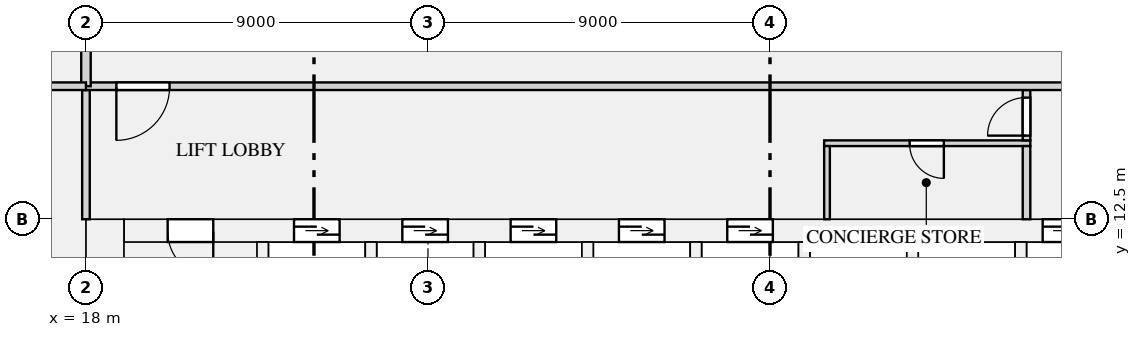
"""IFC4 building model, lengths in metres.
Left out: names, types, materials, properties, quantities, classifications, styles, units other than length and angle.
Written with IfcOpenShell. Run it as: python <this file> out.ifc"""

import sys

from ifc_helpers import new_model, si_unit, direction, frame, frame_2d, origin, place, context, subcontext, project, spatial, rectangle, extrude, element, fill, save


model = new_model("IFC4")
c1 = context("Model", 3, precision=1e-05, world=origin(), true_north=direction((0.0, 1.0)))
c2 = subcontext(c1, "Body", "Model", "MODEL_VIEW")
j1 = project(units=[si_unit("LENGTHUNIT", "METRE"), si_unit("PLANEANGLEUNIT", "RADIAN")], contexts=[c1])
p1 = place(None, origin())
s1 = spatial("IfcSite", under=j1, at=p1, CompositionType="ELEMENT")
p2 = place(p1, origin())
s2 = spatial("IfcBuilding", under=s1, at=p2, CompositionType="ELEMENT")
p3 = place(p2, frame((0.0, 0.0, 6.5)))
s3 = spatial("IfcBuildingStorey", under=s2, at=p3, CompositionType="ELEMENT", Elevation=6.5)
p4 = place(p3, frame((18.5, 0.0, 0.0), z_axis=(0.0, 0.0, 1.0), x_axis=(0.0, 1.0, 0.0)))
e1 = element("IfcWall", 1, at=p4, inside=s3, PredefinedType="SHEAR", context=c2, shape_type="SweptSolid", body=[
    extrude(rectangle(XDim=12.5, YDim=1.0, at=frame_2d((6.25, 0.0))), origin(), (0.0, 0.0, 1.0), 4.5),
])
p5 = place(p3, frame((19.0, 12.2, 0.0), z_axis=(0.0, 0.0, 1.0), x_axis=(1.0, 0.0, 0.0)))
e2 = element("IfcWall", 2, at=p5, inside=s3, PredefinedType="SHEAR", context=c2, shape_type="SweptSolid", body=[
    extrude(rectangle(XDim=34.0, YDim=0.6, at=frame_2d((17.0, 0.0))), origin(), (0.0, 0.0, 1.0), 4.5),
])
p6 = place(p5, frame((4.475, 0.0, 0.0)))
e3 = element("IfcOpeningElement", 3, at=p6, cuts=e2, PredefinedType="OPENING", context=c2, shape_type="SweptSolid", body=[
    extrude(rectangle(XDim=1.2, YDim=2.1, at=frame_2d((0.6, 1.05))), frame((0.0, 0.31, 0.0), z_axis=(0.0, -1.0, 0.0), x_axis=(1.0, 0.0, 0.0)), (0.0, 0.0, 1.0), 0.62),
])
p7 = place(p5, frame((7.325, 0.0, 0.0)))
e4 = element("IfcOpeningElement", 4, at=p7, cuts=e2, PredefinedType="OPENING", context=c2, shape_type="SweptSolid", body=[
    extrude(rectangle(XDim=1.2, YDim=2.1, at=frame_2d((0.6, 1.05))), frame((0.0, 0.31, 0.0), z_axis=(0.0, -1.0, 0.0), x_axis=(1.0, 0.0, 0.0)), (0.0, 0.0, 1.0), 0.62),
])
p8 = place(p5, frame((10.175, 0.0, 0.0)))
e5 = element("IfcOpeningElement", 5, at=p8, cuts=e2, PredefinedType="OPENING", context=c2, shape_type="SweptSolid", body=[
    extrude(rectangle(XDim=1.2, YDim=2.1, at=frame_2d((0.6, 1.05))), frame((0.0, 0.31, 0.0), z_axis=(0.0, -1.0, 0.0), x_axis=(1.0, 0.0, 0.0)), (0.0, 0.0, 1.0), 0.62),
])
p9 = place(p5, frame((13.025, 0.0, 0.0)))
e6 = element("IfcOpeningElement", 6, at=p9, cuts=e2, PredefinedType="OPENING", context=c2, shape_type="SweptSolid", body=[
    extrude(rectangle(XDim=1.2, YDim=2.1, at=frame_2d((0.6, 1.05))), frame((0.0, 0.31, 0.0), z_axis=(0.0, -1.0, 0.0), x_axis=(1.0, 0.0, 0.0)), (0.0, 0.0, 1.0), 0.62),
])
p10 = place(p5, frame((15.875, 0.0, 0.0)))
e7 = element("IfcOpeningElement", 7, at=p10, cuts=e2, PredefinedType="OPENING", context=c2, shape_type="SweptSolid", body=[
    extrude(rectangle(XDim=1.2, YDim=2.1, at=frame_2d((0.6, 1.05))), frame((0.0, 0.31, 0.0), z_axis=(0.0, -1.0, 0.0), x_axis=(1.0, 0.0, 0.0)), (0.0, 0.0, 1.0), 0.62),
])
p11 = place(p5, frame((24.175, 0.0, 0.0)))
e8 = element("IfcOpeningElement", 8, at=p11, cuts=e2, PredefinedType="OPENING", context=c2, shape_type="SweptSolid", body=[
    extrude(rectangle(XDim=1.1, YDim=2.1, at=frame_2d((0.55, 1.05))), frame((0.0, 0.31, 0.0), z_axis=(0.0, -1.0, 0.0), x_axis=(1.0, 0.0, 0.0)), (0.0, 0.0, 1.0), 0.62),
])
p12 = place(p5, frame((26.425, 0.0, 0.0)))
e9 = element("IfcOpeningElement", 9, at=p12, cuts=e2, PredefinedType="OPENING", context=c2, shape_type="SweptSolid", body=[
    extrude(rectangle(XDim=1.1, YDim=2.1, at=frame_2d((0.55, 1.05))), frame((0.0, 0.31, 0.0), z_axis=(0.0, -1.0, 0.0), x_axis=(1.0, 0.0, 0.0)), (0.0, 0.0, 1.0), 0.62),
])
p13 = place(p5, frame((28.675, 0.0, 0.0)))
e10 = element("IfcOpeningElement", 10, at=p13, cuts=e2, PredefinedType="OPENING", context=c2, shape_type="SweptSolid", body=[
    extrude(rectangle(XDim=1.1, YDim=2.1, at=frame_2d((0.55, 1.05))), frame((0.0, 0.31, 0.0), z_axis=(0.0, -1.0, 0.0), x_axis=(1.0, 0.0, 0.0)), (0.0, 0.0, 1.0), 0.62),
])
p14 = place(p5, frame((1.15, 0.0, 0.0)))
e11 = element("IfcOpeningElement", 11, at=p14, cuts=e2, PredefinedType="OPENING", context=c2, shape_type="SweptSolid", body=[
    extrude(rectangle(XDim=1.2, YDim=2.1, at=frame_2d((0.6, 1.05))), frame((0.0, 0.31, 0.0), z_axis=(0.0, -1.0, 0.0), x_axis=(1.0, 0.0, 0.0)), (0.0, 0.0, 1.0), 0.62),
])
p15 = place(p5, frame((31.65, 0.0, 0.0)))
e12 = element("IfcOpeningElement", 12, at=p15, cuts=e2, PredefinedType="OPENING", context=c2, shape_type="SweptSolid", body=[
    extrude(rectangle(XDim=1.2, YDim=2.1, at=frame_2d((0.6, 1.05))), frame((0.0, 0.31, 0.0), z_axis=(0.0, -1.0, 0.0), x_axis=(1.0, 0.0, 0.0)), (0.0, 0.0, 1.0), 0.62),
])
for number, where, z_axis, x_axis in (
    (13, (22.65, 9.35, 0.0), (0.0, 0.0, 1.0), (0.0, 1.0, 0.0)),
    (14, (25.5, 9.35, 0.0), (0.0, 0.0, 1.0), (0.0, 1.0, 0.0)),
    (15, (28.35, 9.35, 0.0), (0.0, 0.0, 1.0), (0.0, 1.0, 0.0)),
    (16, (31.2, 9.35, 0.0), (0.0, 0.0, 1.0), (0.0, 1.0, 0.0)),
    (17, (34.05, 9.35, 0.0), (0.0, 0.0, 1.0), (0.0, 1.0, 0.0)),
    (18, (36.9, 9.35, 0.0), (0.0, 0.0, 1.0), (0.0, 1.0, 0.0)),
    (19, (39.75, 9.35, 0.0), (0.0, 0.0, 1.0), (0.0, 1.0, 0.0)),
):
    element("IfcWall", number, at=place(p3, frame(where, z_axis=z_axis, x_axis=x_axis)), inside=s3, PredefinedType="SHEAR", context=c2, shape_type="SweptSolid", body=[
        extrude(rectangle(XDim=2.55, YDim=0.3, at=frame_2d((1.275, 0.0))), origin(), (0.0, 0.0, 1.0), 4.5),
    ])
p16 = place(p3, frame((42.6, 8.25, 0.0), z_axis=(0.0, 0.0, 1.0), x_axis=(0.0, 1.0, 0.0)))
e20 = element("IfcWall", 20, at=p16, inside=s3, PredefinedType="SHEAR", context=c2, shape_type="SweptSolid", body=[
    extrude(rectangle(XDim=3.65, YDim=0.3, at=frame_2d((1.825, 0.0))), origin(), (0.0, 0.0, 1.0), 4.5),
])
p17 = place(p3, frame((37.425, 14.5, 0.0), z_axis=(0.0, 0.0, 1.0), x_axis=(1.0, 0.0, 0.0)))
e21 = element("IfcWall", 21, at=p17, inside=s3, PredefinedType="PARTITIONING", context=c2, shape_type="SweptSolid", body=[
    extrude(rectangle(XDim=5.425, YDim=0.15, at=frame_2d((2.712, 0.0))), origin(), (0.0, 0.0, 1.0), 4.098),
])
p18 = place(p17, frame((2.25, 0.0, 0.0)))
e22 = element("IfcOpeningElement", 22, at=p18, cuts=e21, PredefinedType="OPENING", context=c2, shape_type="SweptSolid", body=[
    extrude(rectangle(XDim=0.9, YDim=2.1, at=frame_2d((0.45, 1.05))), frame((0.0, 0.085, 0.0), z_axis=(0.0, -1.0, 0.0), x_axis=(1.0, 0.0, 0.0)), (0.0, 0.0, 1.0), 0.17),
])
p19 = place(p3, frame((18.0, 12.5, 0.0), z_axis=(0.0, 0.0, 1.0), x_axis=(0.0, 1.0, 0.0)))
e23 = element("IfcWall", 23, at=p19, inside=s3, PredefinedType="PARTITIONING", context=c2, shape_type="SweptSolid", body=[
    extrude(rectangle(XDim=3.4, YDim=0.2, at=frame_2d((1.7, 0.0))), origin(), (0.0, 0.0, 1.0), 4.098),
])
p20 = place(p3, frame((37.5, 12.5, 0.0), z_axis=(0.0, 0.0, 1.0), x_axis=(0.0, 1.0, 0.0)))
e24 = element("IfcWall", 24, at=p20, inside=s3, PredefinedType="PARTITIONING", context=c2, shape_type="SweptSolid", body=[
    extrude(rectangle(XDim=1.925, YDim=0.15, at=frame_2d((0.962, 0.0))), origin(), (0.0, 0.0, 1.0), 4.098),
])
p21 = place(p3, frame((42.75, 12.5, 0.0), z_axis=(0.0, 0.0, 1.0), x_axis=(0.0, 1.0, 0.0)))
e25 = element("IfcWall", 25, at=p21, inside=s3, PredefinedType="PARTITIONING", context=c2, shape_type="SweptSolid", body=[
    extrude(rectangle(XDim=1.925, YDim=0.2, at=frame_2d((0.962, 0.0))), origin(), (0.0, 0.0, 1.0), 4.098),
])
p22 = place(p3, frame((42.75, 14.575, 0.0), z_axis=(0.0, 0.0, 1.0), x_axis=(0.0, 1.0, 0.0)))
e26 = element("IfcWall", 26, at=p22, inside=s3, PredefinedType="PARTITIONING", context=c2, shape_type="SweptSolid", body=[
    extrude(rectangle(XDim=1.325, YDim=0.2, at=frame_2d((0.663, 0.0))), origin(), (0.0, 0.0, 1.0), 4.098),
])
p23 = place(p22, frame((0.125, 0.0, 0.0)))
e27 = element("IfcOpeningElement", 27, at=p23, cuts=e26, PredefinedType="OPENING", context=c2, shape_type="SweptSolid", body=[
    extrude(rectangle(XDim=1.0, YDim=2.1, at=frame_2d((0.5, 1.05))), frame((0.0, 0.11, 0.0), z_axis=(0.0, -1.0, 0.0), x_axis=(1.0, 0.0, 0.0)), (0.0, 0.0, 1.0), 0.22),
])
p24 = place(p3, frame((17.9, 16.0, 0.0), z_axis=(0.0, 0.0, 1.0), x_axis=(1.0, 0.0, 0.0)))
e28 = element("IfcWall", 28, at=p24, inside=s3, PredefinedType="PARTITIONING", context=c2, shape_type="SweptSolid", body=[
    extrude(rectangle(XDim=36.2, YDim=0.2, at=frame_2d((18.1, 0.0))), origin(), (0.0, 0.0, 1.0), 4.098),
])
p25 = place(p24, frame((0.9, 0.0, 0.0)))
e29 = element("IfcOpeningElement", 29, at=p25, cuts=e28, PredefinedType="OPENING", context=c2, shape_type="SweptSolid", body=[
    extrude(rectangle(XDim=1.4, YDim=2.1, at=frame_2d((0.7, 1.05))), frame((0.0, 0.11, 0.0), z_axis=(0.0, -1.0, 0.0), x_axis=(1.0, 0.0, 0.0)), (0.0, 0.0, 1.0), 0.22),
])
p26 = place(p24, frame((33.9, 0.0, 0.0)))
e30 = element("IfcOpeningElement", 30, at=p26, cuts=e28, PredefinedType="OPENING", context=c2, shape_type="SweptSolid", body=[
    extrude(rectangle(XDim=1.4, YDim=2.1, at=frame_2d((0.7, 1.05))), frame((0.0, 0.11, 0.0), z_axis=(0.0, -1.0, 0.0), x_axis=(1.0, 0.0, 0.0)), (0.0, 0.0, 1.0), 0.22),
])
p27 = place(p3, frame((18.0, 16.0, 0.0), z_axis=(0.0, 0.0, 1.0), x_axis=(0.0, 1.0, 0.0)))
e31 = element("IfcWall", 31, at=p27, inside=s3, PredefinedType="PARTITIONING", context=c2, shape_type="SweptSolid", body=[
    extrude(rectangle(XDim=7.0, YDim=0.25, at=frame_2d((3.5, 0.0))), origin(), (0.0, 0.0, 1.0), 4.098),
])
p28 = place(p27, frame((2.6, 0.0, 0.0)))
e32 = element("IfcOpeningElement", 32, at=p28, cuts=e31, PredefinedType="OPENING", context=c2, shape_type="SweptSolid", body=[
    extrude(rectangle(XDim=1.8, YDim=2.4, at=frame_2d((0.9, 1.2))), frame((0.0, 0.135, 0.0), z_axis=(0.0, -1.0, 0.0), x_axis=(1.0, 0.0, 0.0)), (0.0, 0.0, 1.0), 0.27),
])
p29 = place(p3, frame((0.0, 16.0, 0.0), z_axis=(0.0, 0.0, 1.0), x_axis=(1.0, 0.0, 0.0)))
e33 = element("IfcWall", 33, at=p29, inside=s3, PredefinedType="PARTITIONING", context=c2, shape_type="SweptSolid", body=[
    extrude(rectangle(XDim=18.0, YDim=0.2, at=frame_2d((9.0, 0.0))), origin(), (0.0, 0.0, 1.0), 4.098),
])
p30 = place(p29, frame((8.1, 0.0, 0.0)))
e34 = element("IfcOpeningElement", 34, at=p30, cuts=e33, PredefinedType="OPENING", context=c2, shape_type="SweptSolid", body=[
    extrude(rectangle(XDim=1.8, YDim=2.4, at=frame_2d((0.9, 1.2))), frame((0.0, 0.11, 0.0), z_axis=(0.0, -1.0, 0.0), x_axis=(1.0, 0.0, 0.0)), (0.0, 0.0, 1.0), 0.22),
])
p31 = place(p6, origin())
e35 = element("IfcDoor", 35, at=p31, inside=s3, OperationType="DOUBLE_DOOR_SLIDING", PredefinedType="DOOR", context=c2, shape_type="SweptSolid", body=[
    extrude(rectangle(XDim=1.2, YDim=2.1, at=frame_2d((0.6, 1.05))), frame((0.0, 0.025, 0.0), z_axis=(0.0, -1.0, 0.0), x_axis=(1.0, 0.0, 0.0)), (0.0, 0.0, 1.0), 0.05),
])
fill(e3, e35)
p32 = place(p7, origin())
e36 = element("IfcDoor", 36, at=p32, inside=s3, OperationType="DOUBLE_DOOR_SLIDING", PredefinedType="DOOR", context=c2, shape_type="SweptSolid", body=[
    extrude(rectangle(XDim=1.2, YDim=2.1, at=frame_2d((0.6, 1.05))), frame((0.0, 0.025, 0.0), z_axis=(0.0, -1.0, 0.0), x_axis=(1.0, 0.0, 0.0)), (0.0, 0.0, 1.0), 0.05),
])
fill(e4, e36)
p33 = place(p8, origin())
e37 = element("IfcDoor", 37, at=p33, inside=s3, OperationType="DOUBLE_DOOR_SLIDING", PredefinedType="DOOR", context=c2, shape_type="SweptSolid", body=[
    extrude(rectangle(XDim=1.2, YDim=2.1, at=frame_2d((0.6, 1.05))), frame((0.0, 0.025, 0.0), z_axis=(0.0, -1.0, 0.0), x_axis=(1.0, 0.0, 0.0)), (0.0, 0.0, 1.0), 0.05),
])
fill(e5, e37)
p34 = place(p9, origin())
e38 = element("IfcDoor", 38, at=p34, inside=s3, OperationType="DOUBLE_DOOR_SLIDING", PredefinedType="DOOR", context=c2, shape_type="SweptSolid", body=[
    extrude(rectangle(XDim=1.2, YDim=2.1, at=frame_2d((0.6, 1.05))), frame((0.0, 0.025, 0.0), z_axis=(0.0, -1.0, 0.0), x_axis=(1.0, 0.0, 0.0)), (0.0, 0.0, 1.0), 0.05),
])
fill(e6, e38)
p35 = place(p10, origin())
e39 = element("IfcDoor", 39, at=p35, inside=s3, OperationType="DOUBLE_DOOR_SLIDING", PredefinedType="DOOR", context=c2, shape_type="SweptSolid", body=[
    extrude(rectangle(XDim=1.2, YDim=2.1, at=frame_2d((0.6, 1.05))), frame((0.0, 0.025, 0.0), z_axis=(0.0, -1.0, 0.0), x_axis=(1.0, 0.0, 0.0)), (0.0, 0.0, 1.0), 0.05),
])
fill(e7, e39)
p36 = place(p11, origin())
e40 = element("IfcDoor", 40, at=p36, inside=s3, OperationType="DOUBLE_DOOR_SLIDING", PredefinedType="DOOR", context=c2, shape_type="SweptSolid", body=[
    extrude(rectangle(XDim=1.1, YDim=2.1, at=frame_2d((0.55, 1.05))), frame((0.0, 0.025, 0.0), z_axis=(0.0, -1.0, 0.0), x_axis=(1.0, 0.0, 0.0)), (0.0, 0.0, 1.0), 0.05),
])
fill(e8, e40)
p37 = place(p18, frame((0.9, 0.0, 0.0), z_axis=(0.0, 0.0, 1.0), x_axis=(-1.0, 0.0, 0.0)))
e41 = element("IfcDoor", 41, at=p37, inside=s3, OperationType="SINGLE_SWING_LEFT", PredefinedType="DOOR", context=c2, shape_type="SweptSolid", body=[
    extrude(rectangle(XDim=0.9, YDim=2.1, at=frame_2d((0.45, 1.05))), frame((0.0, 0.025, 0.0), z_axis=(0.0, -1.0, 0.0), x_axis=(1.0, 0.0, 0.0)), (0.0, 0.0, 1.0), 0.05),
])
fill(e22, e41)
p38 = place(p14, frame((1.2, 0.0, 0.0), z_axis=(0.0, 0.0, 1.0), x_axis=(-1.0, 0.0, 0.0)))
e42 = element("IfcDoor", 42, at=p38, inside=s3, OperationType="SINGLE_SWING_LEFT", PredefinedType="DOOR", context=c2, shape_type="SweptSolid", body=[
    extrude(rectangle(XDim=1.2, YDim=2.1, at=frame_2d((0.6, 1.05))), frame((0.0, 0.025, 0.0), z_axis=(0.0, -1.0, 0.0), x_axis=(1.0, 0.0, 0.0)), (0.0, 0.0, 1.0), 0.05),
])
fill(e11, e42)
p39 = place(p23, origin())
e43 = element("IfcDoor", 43, at=p39, inside=s3, OperationType="SINGLE_SWING_LEFT", PredefinedType="DOOR", context=c2, shape_type="SweptSolid", body=[
    extrude(rectangle(XDim=1.0, YDim=2.1, at=frame_2d((0.5, 1.05))), frame((0.0, 0.025, 0.0), z_axis=(0.0, -1.0, 0.0), x_axis=(1.0, 0.0, 0.0)), (0.0, 0.0, 1.0), 0.05),
])
fill(e27, e43)
p40 = place(p25, frame((1.4, 0.0, 0.0), z_axis=(0.0, 0.0, 1.0), x_axis=(-1.0, 0.0, 0.0)))
e44 = element("IfcDoor", 44, at=p40, inside=s3, OperationType="SINGLE_SWING_RIGHT", PredefinedType="DOOR", context=c2, shape_type="SweptSolid", body=[
    extrude(rectangle(XDim=1.4, YDim=2.1, at=frame_2d((0.7, 1.05))), frame((0.0, 0.025, 0.0), z_axis=(0.0, -1.0, 0.0), x_axis=(1.0, 0.0, 0.0)), (0.0, 0.0, 1.0), 0.05),
])
fill(e29, e44)
save(model, sys.argv[1])
